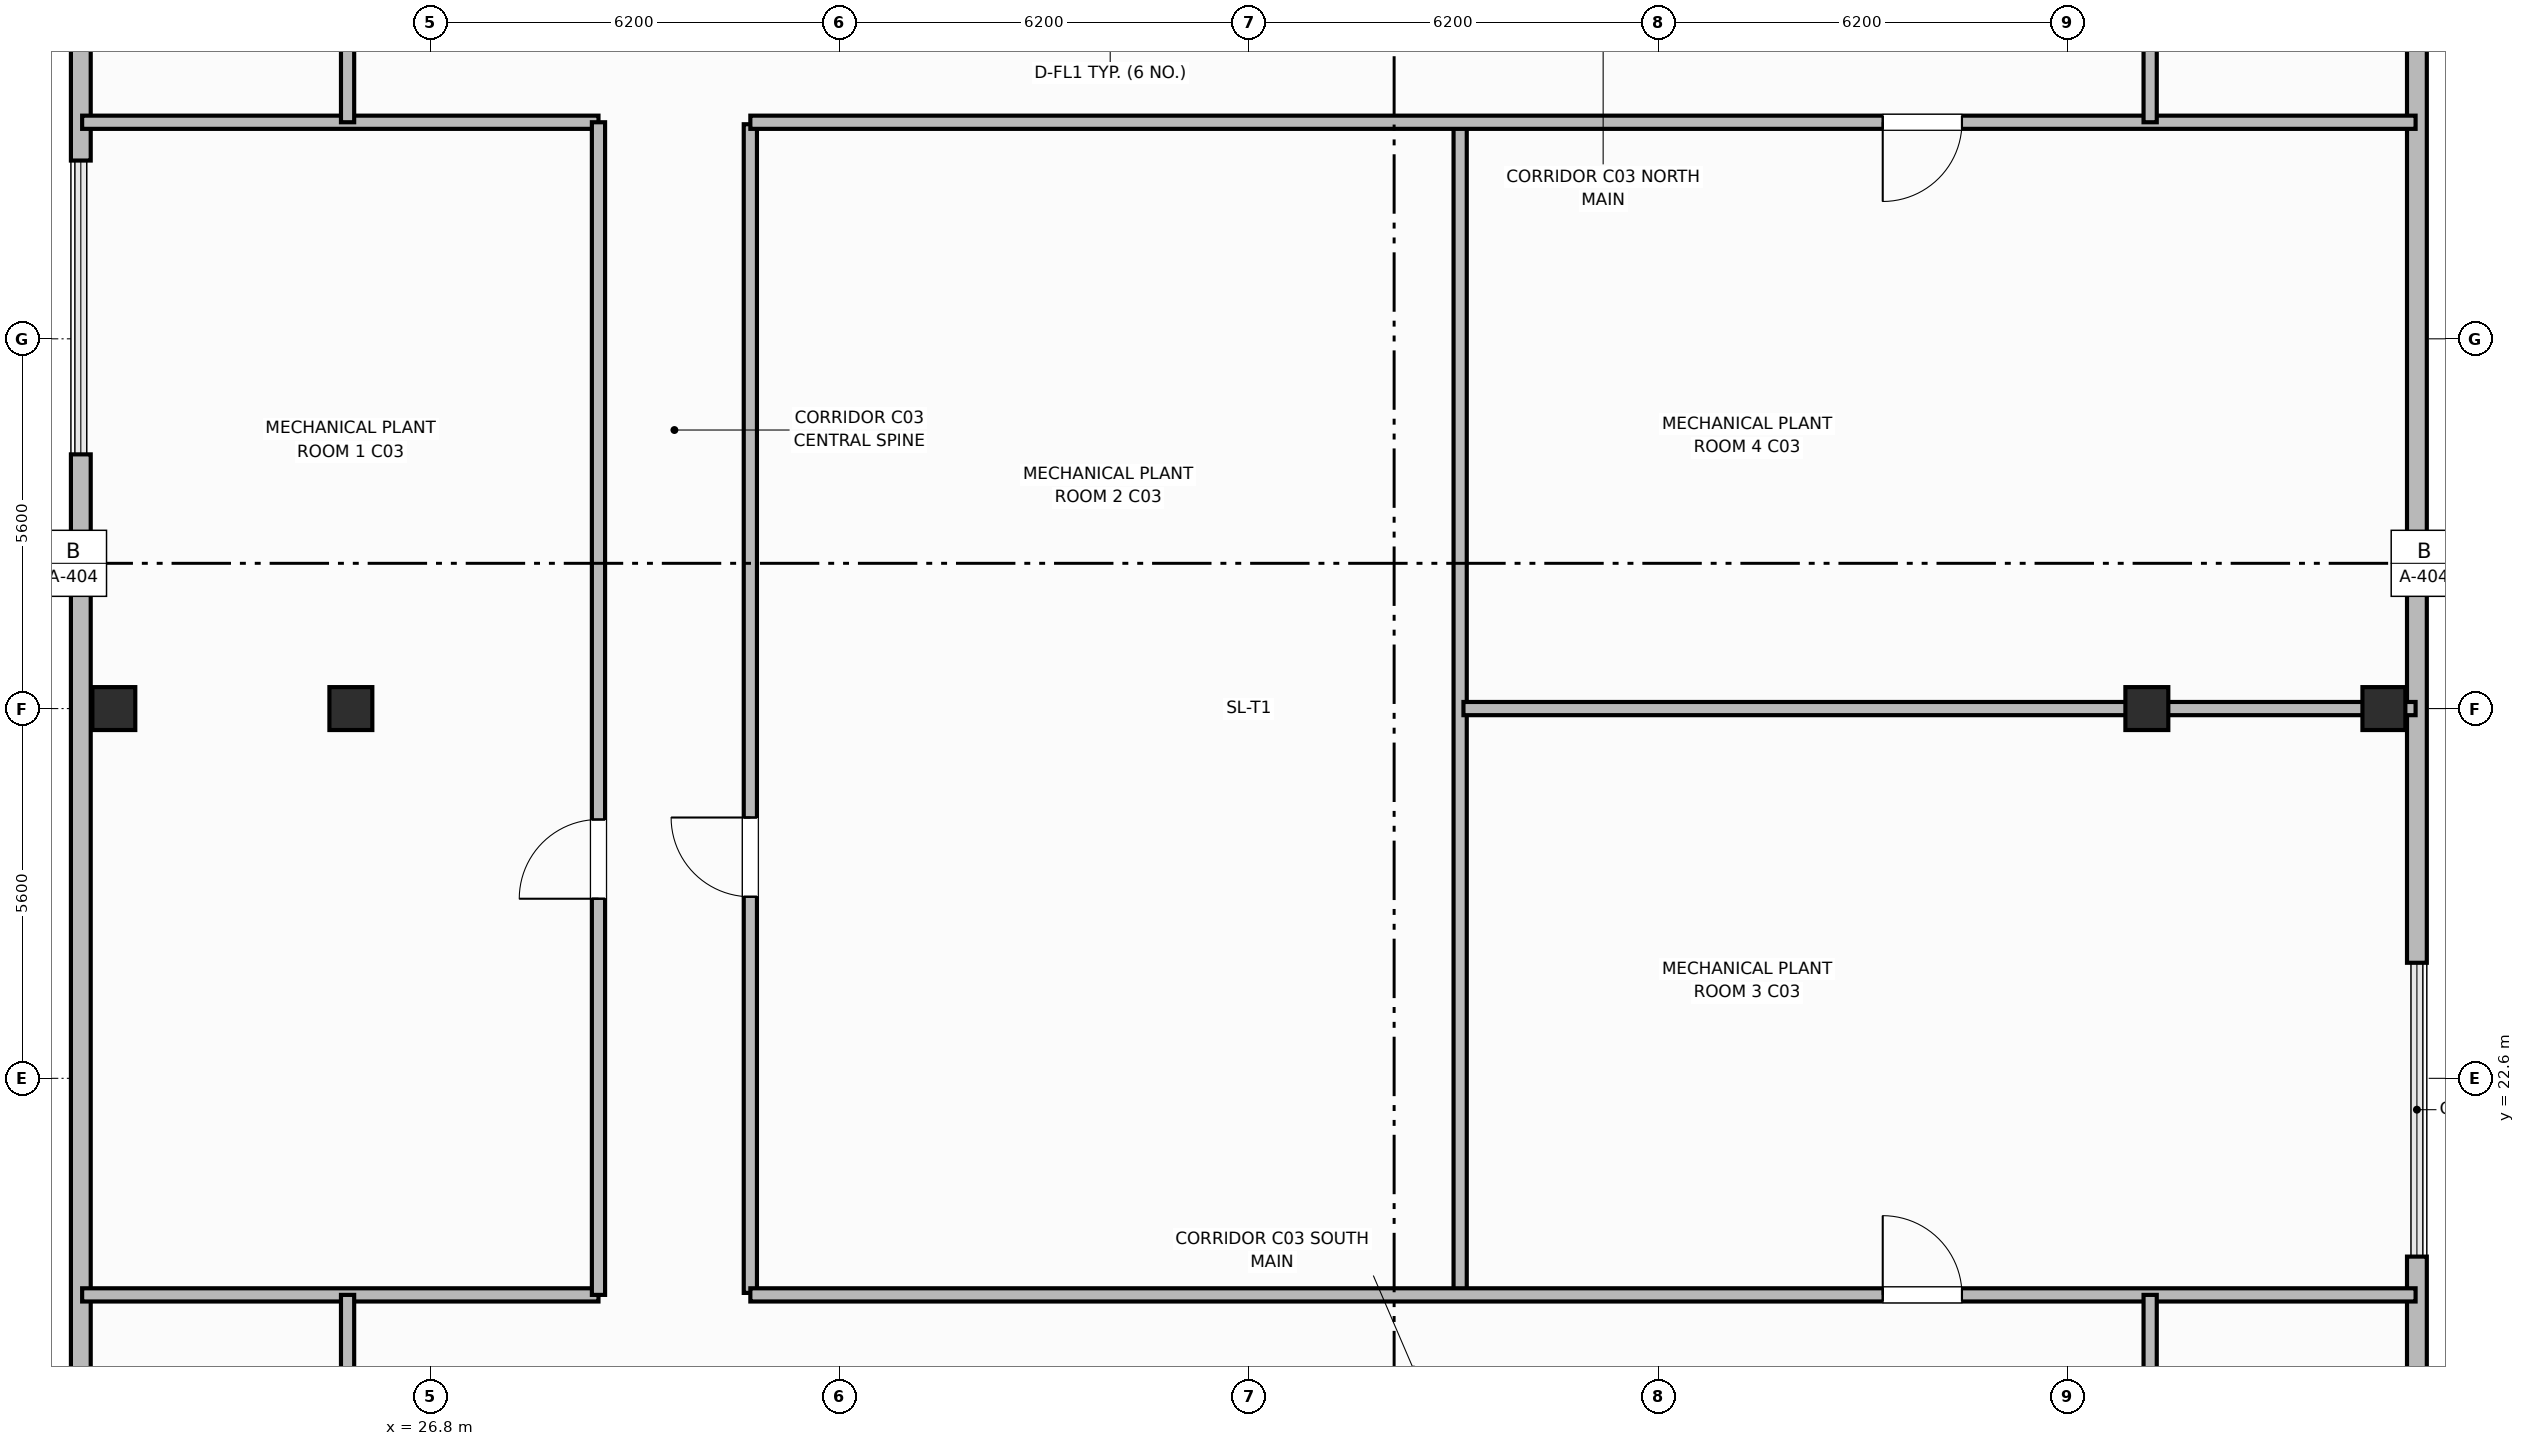
"""IFC4 building model, lengths in metres.
Left out: names, types, materials, properties, quantities, classifications, styles, units other than length and angle.
Written with IfcOpenShell. Run it as: python <this file> out.ifc"""

import sys

from ifc_helpers import new_model, si_unit, direction, frame, frame_2d, origin, origin_2d, place, context, subcontext, project, spatial, rectangle, extrude, element, fill, save


model = new_model("IFC4")
c1 = context("Model", 3, precision=1e-05, world=origin(), true_north=direction((0.0, 1.0)))
c2 = subcontext(c1, "Body", "Model", "MODEL_VIEW")
j1 = project(units=[si_unit("LENGTHUNIT", "METRE"), si_unit("PLANEANGLEUNIT", "RADIAN")], contexts=[c1])
p1 = place(None, origin())
s1 = spatial("IfcSite", under=j1, at=p1, CompositionType="ELEMENT")
p2 = place(p1, origin())
s2 = spatial("IfcBuilding", under=s1, at=p2, CompositionType="ELEMENT")
p3 = place(p2, frame((0.0, 0.0, 309.2)))
s3 = spatial("IfcBuildingStorey", under=s2, at=p3, CompositionType="ELEMENT", Elevation=309.2)
for number, where, z_axis, x_axis in (
    (1, (25.6, 28.2, 0.0), (0.0, 0.0, 1.0), (1.0, 0.0, 0.0)),
    (2, (52.8, 28.2, 0.0), (0.0, 0.0, 1.0), (1.0, 0.0, 0.0)),
    (3, (22.01, 28.2, 0.0), (0.0, 0.0, 1.0), (1.0, 0.0, 0.0)),
    (4, (56.39, 28.2, 0.0), (0.0, 0.0, 1.0), (1.0, 0.0, 0.0)),
):
    element("IfcColumn", number, at=place(p3, frame(where, z_axis=z_axis, x_axis=x_axis)), inside=s3, PredefinedType="COLUMN", context=c2, shape_type="SweptSolid", body=[
        extrude(rectangle(XDim=0.65, YDim=0.65, at=origin_2d()), origin(), (0.0, 0.0, 1.0), 3.6),
    ])
p4 = place(p3, frame((56.89, 12.25, 0.0), z_axis=(0.0, 0.0, 1.0), x_axis=(0.0, 1.0, 0.0)))
e5 = element("IfcWall", 5, at=p4, inside=s3, PredefinedType="SOLIDWALL", context=c2, shape_type="SweptSolid", body=[
    extrude(rectangle(XDim=7.65, YDim=0.3, at=frame_2d((3.825, 0.0))), origin(), (0.0, 0.0, 1.0), 2.84),
])
p5 = place(p3, frame((56.89, 24.35, 0.0), z_axis=(0.0, 0.0, 1.0), x_axis=(0.0, 1.0, 0.0)))
e6 = element("IfcWall", 6, at=p5, inside=s3, PredefinedType="SOLIDWALL", context=c2, shape_type="SweptSolid", body=[
    extrude(rectangle(XDim=19.8, YDim=0.3, at=frame_2d((9.9, 0.0))), origin(), (0.0, 0.0, 1.0), 2.84),
])
p6 = place(p3, frame((21.51, 44.15, 0.0), z_axis=(0.0, 0.0, 1.0), x_axis=(0.0, -1.0, 0.0)))
e7 = element("IfcWall", 7, at=p6, inside=s3, PredefinedType="SOLIDWALL", context=c2, shape_type="SweptSolid", body=[
    extrude(rectangle(XDim=7.65, YDim=0.3, at=frame_2d((3.825, 0.0))), origin(), (0.0, 0.0, 1.0), 2.84),
])
p7 = place(p3, frame((21.51, 32.05, 0.0), z_axis=(0.0, 0.0, 1.0), x_axis=(0.0, -1.0, 0.0)))
e8 = element("IfcWall", 8, at=p7, inside=s3, PredefinedType="SOLIDWALL", context=c2, shape_type="SweptSolid", body=[
    extrude(rectangle(XDim=19.8, YDim=0.3, at=frame_2d((9.9, 0.0))), origin(), (0.0, 0.0, 1.0), 2.84),
])
for number, where, z_axis, x_axis in (
    (9, (21.53, 19.32, 0.0), (0.0, 0.0, 1.0), (1.0, 0.0, 0.0)),
    (10, (21.53, 37.08, 0.0), (0.0, 0.0, 1.0), (1.0, 0.0, 0.0)),
):
    element("IfcWall", number, at=place(p3, frame(where, z_axis=z_axis, x_axis=x_axis)), inside=s3, PredefinedType="PARTITIONING", context=c2, shape_type="SweptSolid", body=[
        extrude(rectangle(XDim=7.82, YDim=0.2, at=frame_2d((3.91, 0.0))), origin(), (0.0, 0.0, 1.0), 2.54),
    ])
p8 = place(p3, frame((29.35, 19.32, 0.0), z_axis=(0.0, 0.0, 1.0), x_axis=(0.0, 1.0, 0.0)))
e11 = element("IfcWall", 11, at=p8, inside=s3, PredefinedType="PARTITIONING", context=c2, shape_type="SweptSolid", body=[
    extrude(rectangle(XDim=17.76, YDim=0.2, at=frame_2d((8.88, 0.0))), origin(), (0.0, 0.0, 1.0), 2.54),
])
p9 = place(p8, frame((6.0, 0.0, 0.0)))
e12 = element("IfcOpeningElement", 12, at=p9, cuts=e11, PredefinedType="OPENING", context=c2, shape_type="SweptSolid", body=[
    extrude(rectangle(XDim=1.2, YDim=2.15, at=frame_2d((0.6, 1.075))), frame((0.0, 0.11, 0.0), z_axis=(0.0, -1.0, 0.0), x_axis=(1.0, 0.0, 0.0)), (0.0, 0.0, 1.0), 0.22),
])
p10 = place(p3, frame((31.65, 19.35, 0.0), z_axis=(0.0, 0.0, 1.0), x_axis=(0.0, 1.0, 0.0)))
e13 = element("IfcWall", 13, at=p10, inside=s3, PredefinedType="PARTITIONING", context=c2, shape_type="SweptSolid", body=[
    extrude(rectangle(XDim=17.7, YDim=0.2, at=frame_2d((8.85, 0.0))), origin(), (0.0, 0.0, 1.0), 2.54),
])
p11 = place(p10, frame((6.0, 0.0, 0.0)))
e14 = element("IfcOpeningElement", 14, at=p11, cuts=e13, PredefinedType="OPENING", context=c2, shape_type="SweptSolid", body=[
    extrude(rectangle(XDim=1.2, YDim=2.15, at=frame_2d((0.6, 1.075))), frame((0.0, 0.11, 0.0), z_axis=(0.0, -1.0, 0.0), x_axis=(1.0, 0.0, 0.0)), (0.0, 0.0, 1.0), 0.22),
])
p12 = place(p3, frame((42.4, 19.35, 0.0), z_axis=(0.0, 0.0, 1.0), x_axis=(0.0, 1.0, 0.0)))
e15 = element("IfcWall", 15, at=p12, inside=s3, PredefinedType="PARTITIONING", context=c2, shape_type="SweptSolid", body=[
    extrude(rectangle(XDim=17.7, YDim=0.2, at=frame_2d((8.85, 0.0))), origin(), (0.0, 0.0, 1.0), 2.54),
])
p13 = place(p3, frame((42.45, 28.2, 0.0), z_axis=(0.0, 0.0, 1.0), x_axis=(1.0, 0.0, 0.0)))
e16 = element("IfcWall", 16, at=p13, inside=s3, PredefinedType="PARTITIONING", context=c2, shape_type="SweptSolid", body=[
    extrude(rectangle(XDim=14.42, YDim=0.2, at=frame_2d((7.21, 0.0))), origin(), (0.0, 0.0, 1.0), 2.54),
])
p14 = place(p3, frame((31.65, 19.32, 0.0), z_axis=(0.0, 0.0, 1.0), x_axis=(1.0, 0.0, 0.0)))
e17 = element("IfcWall", 17, at=p14, inside=s3, PredefinedType="PARTITIONING", context=c2, shape_type="SweptSolid", body=[
    extrude(rectangle(XDim=25.22, YDim=0.2, at=frame_2d((12.61, 0.0))), origin(), (0.0, 0.0, 1.0), 2.54),
])
p15 = place(p14, frame((17.15, 0.0, 0.0)))
e18 = element("IfcOpeningElement", 18, at=p15, cuts=e17, PredefinedType="OPENING", context=c2, shape_type="SweptSolid", body=[
    extrude(rectangle(XDim=1.2, YDim=2.15, at=frame_2d((0.6, 1.075))), frame((0.0, 0.11, 0.0), z_axis=(0.0, -1.0, 0.0), x_axis=(1.0, 0.0, 0.0)), (0.0, 0.0, 1.0), 0.22),
])
p16 = place(p3, frame((56.87, 37.08, 0.0), z_axis=(0.0, 0.0, 1.0), x_axis=(-1.0, 0.0, 0.0)))
e19 = element("IfcWall", 19, at=p16, inside=s3, PredefinedType="PARTITIONING", context=c2, shape_type="SweptSolid", body=[
    extrude(rectangle(XDim=25.22, YDim=0.2, at=frame_2d((12.61, 0.0))), origin(), (0.0, 0.0, 1.0), 2.54),
])
p17 = place(p16, frame((6.87, 0.0, 0.0)))
e20 = element("IfcOpeningElement", 20, at=p17, cuts=e19, PredefinedType="OPENING", context=c2, shape_type="SweptSolid", body=[
    extrude(rectangle(XDim=1.2, YDim=2.15, at=frame_2d((0.6, 1.075))), frame((0.0, 0.11, 0.0), z_axis=(0.0, -1.0, 0.0), x_axis=(1.0, 0.0, 0.0)), (0.0, 0.0, 1.0), 0.22),
])
p18 = place(p3, frame((52.85, 16.95, 0.0), z_axis=(0.0, 0.0, 1.0), x_axis=(0.0, 1.0, 0.0)))
e21 = element("IfcWall", 21, at=p18, inside=s3, PredefinedType="PARTITIONING", context=c2, shape_type="SweptSolid", body=[
    extrude(rectangle(XDim=2.37, YDim=0.2, at=frame_2d((1.185, 0.0))), origin(), (0.0, 0.0, 1.0), 2.54),
])
p19 = place(p3, frame((52.85, 37.08, 0.0), z_axis=(0.0, 0.0, 1.0), x_axis=(0.0, 1.0, 0.0)))
e22 = element("IfcWall", 22, at=p19, inside=s3, PredefinedType="PARTITIONING", context=c2, shape_type="SweptSolid", body=[
    extrude(rectangle(XDim=2.37, YDim=0.2, at=frame_2d((1.185, 0.0))), origin(), (0.0, 0.0, 1.0), 2.54),
])
p20 = place(p3, frame((25.55, 16.95, 0.0), z_axis=(0.0, 0.0, 1.0), x_axis=(0.0, 1.0, 0.0)))
e23 = element("IfcWall", 23, at=p20, inside=s3, PredefinedType="PARTITIONING", context=c2, shape_type="SweptSolid", body=[
    extrude(rectangle(XDim=2.37, YDim=0.2, at=frame_2d((1.185, 0.0))), origin(), (0.0, 0.0, 1.0), 2.54),
])
p21 = place(p3, frame((25.55, 37.08, 0.0), z_axis=(0.0, 0.0, 1.0), x_axis=(0.0, 1.0, 0.0)))
e24 = element("IfcWall", 24, at=p21, inside=s3, PredefinedType="PARTITIONING", context=c2, shape_type="SweptSolid", body=[
    extrude(rectangle(XDim=2.37, YDim=0.2, at=frame_2d((1.185, 0.0))), origin(), (0.0, 0.0, 1.0), 2.54),
])
p22 = place(p9, origin())
e25 = element("IfcDoor", 25, at=p22, inside=s3, OperationType="SINGLE_SWING_LEFT", PredefinedType="DOOR", context=c2, shape_type="SweptSolid", body=[
    extrude(rectangle(XDim=1.2, YDim=2.15, at=frame_2d((0.6, 1.075))), frame((0.0, 0.025, 0.0), z_axis=(0.0, -1.0, 0.0), x_axis=(1.0, 0.0, 0.0)), (0.0, 0.0, 1.0), 0.05),
])
fill(e12, e25)
p23 = place(p11, origin())
e26 = element("IfcDoor", 26, at=p23, inside=s3, OperationType="SINGLE_SWING_RIGHT", PredefinedType="DOOR", context=c2, shape_type="SweptSolid", body=[
    extrude(rectangle(XDim=1.2, YDim=2.15, at=frame_2d((0.6, 1.075))), frame((0.0, 0.025, 0.0), z_axis=(0.0, -1.0, 0.0), x_axis=(1.0, 0.0, 0.0)), (0.0, 0.0, 1.0), 0.05),
])
fill(e14, e26)
p24 = place(p15, origin())
e27 = element("IfcDoor", 27, at=p24, inside=s3, OperationType="SINGLE_SWING_LEFT", PredefinedType="DOOR", context=c2, shape_type="SweptSolid", body=[
    extrude(rectangle(XDim=1.2, YDim=2.15, at=frame_2d((0.6, 1.075))), frame((0.0, 0.025, 0.0), z_axis=(0.0, -1.0, 0.0), x_axis=(1.0, 0.0, 0.0)), (0.0, 0.0, 1.0), 0.05),
])
fill(e18, e27)
p25 = place(p17, origin())
e28 = element("IfcDoor", 28, at=p25, inside=s3, OperationType="SINGLE_SWING_RIGHT", PredefinedType="DOOR", context=c2, shape_type="SweptSolid", body=[
    extrude(rectangle(XDim=1.2, YDim=2.15, at=frame_2d((0.6, 1.075))), frame((0.0, 0.025, 0.0), z_axis=(0.0, -1.0, 0.0), x_axis=(1.0, 0.0, 0.0)), (0.0, 0.0, 1.0), 0.05),
])
fill(e20, e28)
save(model, sys.argv[1])
